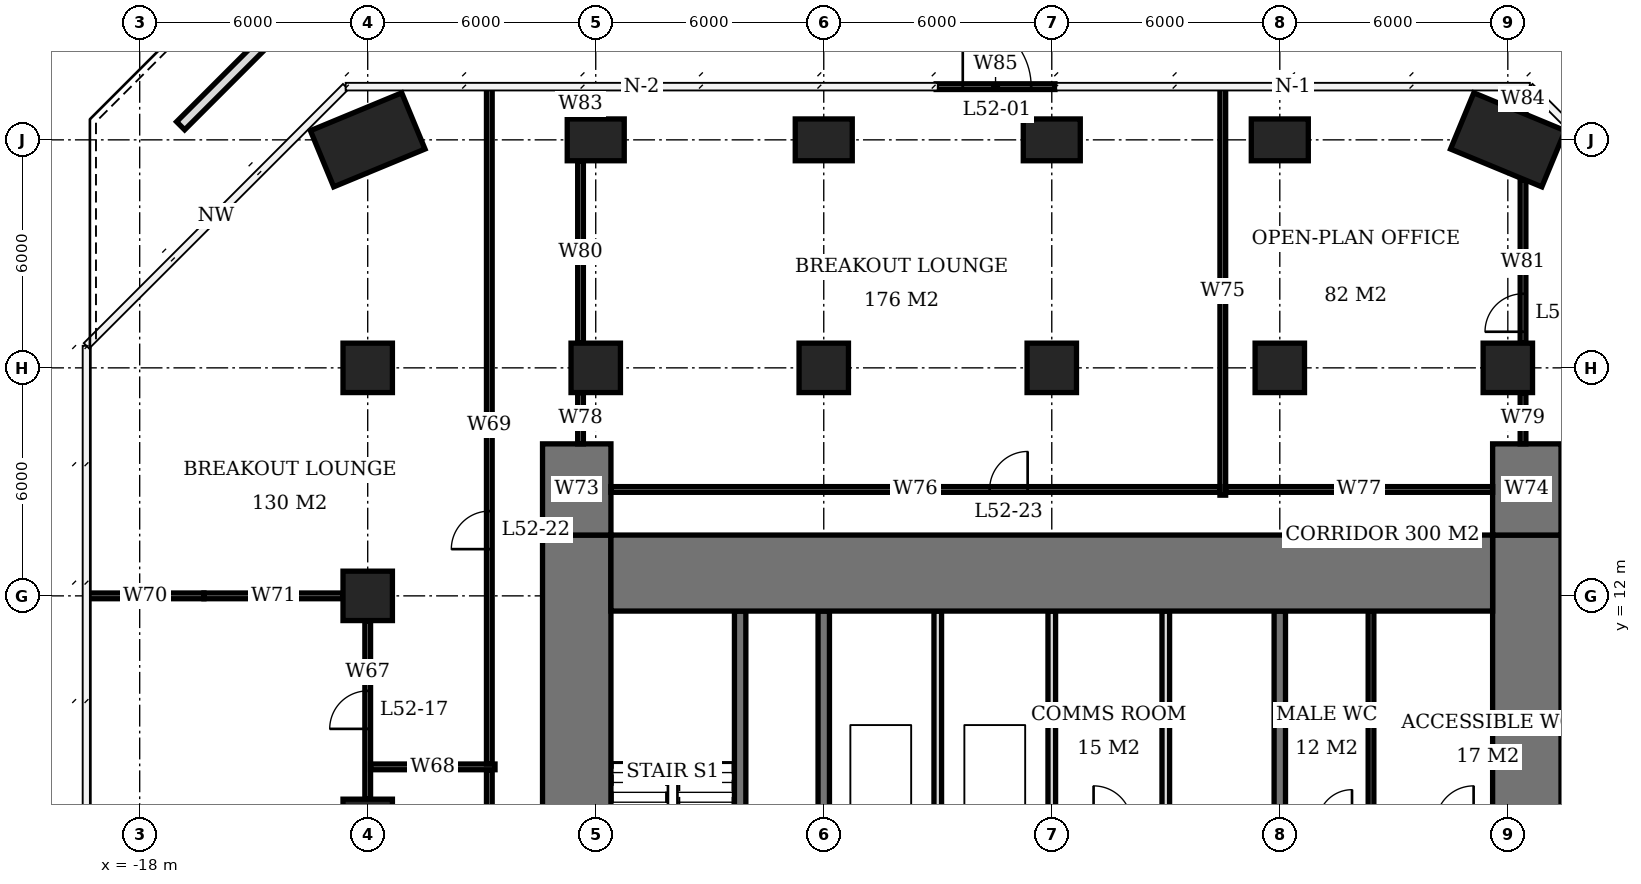
"""IFC4 building model, lengths in metres.
Left out: names, types, materials, properties, quantities, classifications, styles, units other than length and angle.
Written with IfcOpenShell. Run it as: python <this file> out.ifc"""

import sys

from ifc_helpers import new_model, si_unit, direction, frame, frame_2d, origin, origin_2d, place, context, subcontext, project, spatial, rectangle, extrude, element, fill, save


model = new_model("IFC4")
c1 = context("Model", 3, precision=1e-05, world=origin(), true_north=direction((0.0, 1.0)))
c2 = subcontext(c1, "Body", "Model", "MODEL_VIEW")
j1 = project(units=[si_unit("LENGTHUNIT", "METRE"), si_unit("PLANEANGLEUNIT", "RADIAN")], contexts=[c1])
p1 = place(None, origin())
s1 = spatial("IfcSite", under=j1, at=p1, CompositionType="ELEMENT")
p2 = place(p1, origin())
s2 = spatial("IfcBuilding", under=s1, at=p2, CompositionType="ELEMENT")
p3 = place(p2, frame((0.0, 0.0, 212.3)))
s3 = spatial("IfcBuildingStorey", under=s2, at=p3, CompositionType="ELEMENT", Elevation=212.3)
for number, where, z_axis, x_axis in (
    (1, (-12.0, 6.0, 0.0), (0.0, 0.0, 1.0), (1.0, 0.0, 0.0)),
    (2, (-12.0, 12.0, 0.0), (0.0, 0.0, 1.0), (1.0, 0.0, 0.0)),
    (3, (-12.0, 18.0, 0.0), (0.0, 0.0, 1.0), (1.0, 0.0, 0.0)),
):
    element("IfcColumn", number, at=place(p3, frame(where, z_axis=z_axis, x_axis=x_axis)), inside=s3, PredefinedType="COLUMN", context=c2, shape_type="SweptSolid", body=[
        extrude(rectangle(XDim=1.3, YDim=1.3, at=origin_2d()), origin(), (0.0, 0.0, 1.0), 3.9),
    ])
p4 = place(p3, frame((-12.0, 24.0, 0.0), z_axis=(0.0, 0.0, 1.0), x_axis=(0.923879532511, 0.382683432365, 0.0)))
e4 = element("IfcColumn", 4, at=p4, inside=s3, PredefinedType="COLUMN", context=c2, shape_type="SweptSolid", body=[
    extrude(rectangle(XDim=2.6, YDim=1.6, at=origin_2d()), origin(), (0.0, 0.0, 1.0), 3.9),
])
p5 = place(p3, frame((-6.0, 18.0, 0.0), z_axis=(0.0, 0.0, 1.0), x_axis=(1.0, 0.0, 0.0)))
e5 = element("IfcColumn", 5, at=p5, inside=s3, PredefinedType="COLUMN", context=c2, shape_type="SweptSolid", body=[
    extrude(rectangle(XDim=1.3, YDim=1.3, at=origin_2d()), origin(), (0.0, 0.0, 1.0), 3.9),
])
p6 = place(p3, frame((-6.0, 24.0, 0.0), z_axis=(0.0, 0.0, 1.0), x_axis=(1.0, 0.0, 0.0)))
e6 = element("IfcColumn", 6, at=p6, inside=s3, PredefinedType="COLUMN", context=c2, shape_type="SweptSolid", body=[
    extrude(rectangle(XDim=1.5, YDim=1.1, at=origin_2d()), origin(), (0.0, 0.0, 1.0), 3.9),
])
p7 = place(p3, frame((0.0, 18.0, 0.0), z_axis=(0.0, 0.0, 1.0), x_axis=(1.0, 0.0, 0.0)))
e7 = element("IfcColumn", 7, at=p7, inside=s3, PredefinedType="COLUMN", context=c2, shape_type="SweptSolid", body=[
    extrude(rectangle(XDim=1.3, YDim=1.3, at=origin_2d()), origin(), (0.0, 0.0, 1.0), 3.9),
])
p8 = place(p3, frame((0.0, 24.0, 0.0), z_axis=(0.0, 0.0, 1.0), x_axis=(1.0, 0.0, 0.0)))
e8 = element("IfcColumn", 8, at=p8, inside=s3, PredefinedType="COLUMN", context=c2, shape_type="SweptSolid", body=[
    extrude(rectangle(XDim=1.5, YDim=1.1, at=origin_2d()), origin(), (0.0, 0.0, 1.0), 3.9),
])
p9 = place(p3, frame((6.0, 18.0, 0.0), z_axis=(0.0, 0.0, 1.0), x_axis=(1.0, 0.0, 0.0)))
e9 = element("IfcColumn", 9, at=p9, inside=s3, PredefinedType="COLUMN", context=c2, shape_type="SweptSolid", body=[
    extrude(rectangle(XDim=1.3, YDim=1.3, at=origin_2d()), origin(), (0.0, 0.0, 1.0), 3.9),
])
p10 = place(p3, frame((6.0, 24.0, 0.0), z_axis=(0.0, 0.0, 1.0), x_axis=(1.0, 0.0, 0.0)))
e10 = element("IfcColumn", 10, at=p10, inside=s3, PredefinedType="COLUMN", context=c2, shape_type="SweptSolid", body=[
    extrude(rectangle(XDim=1.5, YDim=1.1, at=origin_2d()), origin(), (0.0, 0.0, 1.0), 3.9),
])
p11 = place(p3, frame((12.0, 18.0, 0.0), z_axis=(0.0, 0.0, 1.0), x_axis=(1.0, 0.0, 0.0)))
e11 = element("IfcColumn", 11, at=p11, inside=s3, PredefinedType="COLUMN", context=c2, shape_type="SweptSolid", body=[
    extrude(rectangle(XDim=1.3, YDim=1.3, at=origin_2d()), origin(), (0.0, 0.0, 1.0), 3.9),
])
p12 = place(p3, frame((12.0, 24.0, 0.0), z_axis=(0.0, 0.0, 1.0), x_axis=(1.0, 0.0, 0.0)))
e12 = element("IfcColumn", 12, at=p12, inside=s3, PredefinedType="COLUMN", context=c2, shape_type="SweptSolid", body=[
    extrude(rectangle(XDim=1.5, YDim=1.1, at=origin_2d()), origin(), (0.0, 0.0, 1.0), 3.9),
])
p13 = place(p3, frame((18.0, 18.0, 0.0), z_axis=(0.0, 0.0, 1.0), x_axis=(1.0, 0.0, 0.0)))
e13 = element("IfcColumn", 13, at=p13, inside=s3, PredefinedType="COLUMN", context=c2, shape_type="SweptSolid", body=[
    extrude(rectangle(XDim=1.3, YDim=1.3, at=origin_2d()), origin(), (0.0, 0.0, 1.0), 3.9),
])
p14 = place(p3, frame((18.0, 24.0, 0.0), z_axis=(0.0, 0.0, 1.0), x_axis=(0.923879532511, -0.382683432365, 0.0)))
e14 = element("IfcColumn", 14, at=p14, inside=s3, PredefinedType="COLUMN", context=c2, shape_type="SweptSolid", body=[
    extrude(rectangle(XDim=2.6, YDim=1.6, at=origin_2d()), origin(), (0.0, 0.0, 1.0), 3.9),
])
p15 = place(p3, frame((-5.6, 12.6, 0.0), z_axis=(0.0, 0.0, 1.0), x_axis=(1.0, 0.0, 0.0)))
e15 = element("IfcWall", 15, at=p15, inside=s3, PredefinedType="SHEAR", context=c2, shape_type="SweptSolid", body=[
    extrude(rectangle(XDim=23.2, YDim=2.0, at=frame_2d((11.6, 0.0))), origin(), (0.0, 0.0, 1.0), 3.9),
])
p16 = place(p3, frame((-6.5, -7.6, 0.0), z_axis=(0.0, 0.0, 1.0), x_axis=(0.0, 1.0, 0.0)))
e16 = element("IfcWall", 16, at=p16, inside=s3, PredefinedType="SHEAR", context=c2, shape_type="SweptSolid", body=[
    extrude(rectangle(XDim=21.2, YDim=1.8, at=frame_2d((10.6, 0.0))), origin(), (0.0, 0.0, 1.0), 3.9),
])
p17 = place(p16, frame((7.8, 0.0, 0.0)))
e17 = element("IfcOpeningElement", 17, at=p17, cuts=e16, PredefinedType="OPENING", context=c2, shape_type="SweptSolid", body=[
    extrude(rectangle(XDim=1.8, YDim=2.4, at=frame_2d((0.9, 1.2))), frame((0.0, 0.91, 0.0), z_axis=(0.0, -1.0, 0.0), x_axis=(1.0, 0.0, 0.0)), (0.0, 0.0, 1.0), 1.82),
])
p18 = place(p3, frame((18.5, -7.6, 0.0), z_axis=(0.0, 0.0, 1.0), x_axis=(0.0, 1.0, 0.0)))
e18 = element("IfcWall", 18, at=p18, inside=s3, PredefinedType="SHEAR", context=c2, shape_type="SweptSolid", body=[
    extrude(rectangle(XDim=21.2, YDim=1.8, at=frame_2d((10.6, 0.0))), origin(), (0.0, 0.0, 1.0), 3.9),
])
p19 = place(p18, frame((9.2, 0.0, 0.0)))
e19 = element("IfcOpeningElement", 19, at=p19, cuts=e18, PredefinedType="OPENING", context=c2, shape_type="SweptSolid", body=[
    extrude(rectangle(XDim=1.8, YDim=2.4, at=frame_2d((0.9, 1.2))), frame((0.0, 0.91, 0.0), z_axis=(0.0, -1.0, 0.0), x_axis=(1.0, 0.0, 0.0)), (0.0, 0.0, 1.0), 1.82),
])
for number, where, z_axis, x_axis in (
    (20, (-6.5, 13.6, 0.0), (0.0, 0.0, 1.0), (0.0, 1.0, 0.0)),
    (21, (18.5, 13.6, 0.0), (0.0, 0.0, 1.0), (0.0, 1.0, 0.0)),
):
    element("IfcWall", number, at=place(p3, frame(where, z_axis=z_axis, x_axis=x_axis)), inside=s3, PredefinedType="SHEAR", context=c2, shape_type="SweptSolid", body=[
        extrude(rectangle(XDim=2.4, YDim=1.8, at=frame_2d((1.2, 0.0))), origin(), (0.0, 0.0, 1.0), 3.9),
    ])
p20 = place(p3, frame((0.0, 3.15, 0.0), z_axis=(0.0, 0.0, 1.0), x_axis=(0.0, 1.0, 0.0)))
e22 = element("IfcWall", 22, at=p20, inside=s3, PredefinedType="SHEAR", context=c2, shape_type="SweptSolid", body=[
    extrude(rectangle(XDim=8.45, YDim=0.3, at=frame_2d((4.225, 0.0))), origin(), (0.0, 0.0, 1.0), 3.9),
])
p21 = place(p3, frame((12.0, 6.15, 0.0), z_axis=(0.0, 0.0, 1.0), x_axis=(0.0, 1.0, 0.0)))
e23 = element("IfcWall", 23, at=p21, inside=s3, PredefinedType="SHEAR", context=c2, shape_type="SweptSolid", body=[
    extrude(rectangle(XDim=5.45, YDim=0.3, at=frame_2d((2.725, 0.0))), origin(), (0.0, 0.0, 1.0), 3.9),
])
p22 = place(p3, frame((-2.2, 3.15, 0.0), z_axis=(0.0, 0.0, 1.0), x_axis=(0.0, 1.0, 0.0)))
e24 = element("IfcWall", 24, at=p22, inside=s3, PredefinedType="SHEAR", context=c2, shape_type="SweptSolid", body=[
    extrude(rectangle(XDim=8.45, YDim=0.3, at=frame_2d((4.225, 0.0))), origin(), (0.0, 0.0, 1.0), 3.9),
])
for number, where, z_axis, x_axis in (
    (25, (3.0, 6.15, 0.0), (0.0, 0.0, 1.0), (0.0, 1.0, 0.0)),
    (26, (6.0, 6.15, 0.0), (0.0, 0.0, 1.0), (0.0, 1.0, 0.0)),
    (27, (9.0, 6.15, 0.0), (0.0, 0.0, 1.0), (0.0, 1.0, 0.0)),
):
    element("IfcWall", number, at=place(p3, frame(where, z_axis=z_axis, x_axis=x_axis)), inside=s3, PredefinedType="SOLIDWALL", context=c2, shape_type="SweptSolid", body=[
        extrude(rectangle(XDim=5.45, YDim=0.2, at=frame_2d((2.725, 0.0))), origin(), (0.0, 0.0, 1.0), 3.9),
    ])
p23 = place(p3, frame((2.958, 25.4, 0.0), z_axis=(0.0, 0.0, 1.0), x_axis=(1.0, 0.0, 0.0)))
e28 = element("IfcWall", 28, at=p23, inside=s3, PredefinedType="USERDEFINED", context=c2, shape_type="SweptSolid", body=[
    extrude(rectangle(XDim=3.126, YDim=0.15, at=frame_2d((1.563, 0.0))), origin(), (0.0, 0.0, 1.0), 3.9),
])
p24 = place(p23, frame((0.7, 0.0, 0.0)))
e29 = element("IfcOpeningElement", 29, at=p24, cuts=e28, PredefinedType="OPENING", context=c2, shape_type="SweptSolid", body=[
    extrude(rectangle(XDim=1.8, YDim=2.4, at=frame_2d((0.9, 1.2))), frame((0.0, 0.085, 0.0), z_axis=(0.0, -1.0, 0.0), x_axis=(1.0, 0.0, 0.0)), (0.0, 0.0, 1.0), 0.17),
])
for number, where, z_axis, x_axis in (
    (30, (-16.923, 24.37, 0.0), (0.0, 0.0, 1.0), (0.707, 0.707, 0.0)),
    (31, (18.37, 28.923, 0.0), (0.0, 0.0, 1.0), (0.707, -0.707, 0.0)),
):
    element("IfcWall", number, at=place(p3, frame(where, z_axis=z_axis, x_axis=x_axis)), inside=s3, PredefinedType="USERDEFINED", context=c2, shape_type="SweptSolid", body=[
        extrude(rectangle(XDim=6.438, YDim=0.3, at=frame_2d((3.219, 0.0))), origin(), (0.0, 0.0, 1.0), 0.6),
    ])
p25 = place(p3, frame((14.4, 6.15, 0.0), z_axis=(0.0, 0.0, 1.0), x_axis=(0.0, 1.0, 0.0)))
e32 = element("IfcWall", 32, at=p25, inside=s3, PredefinedType="PLUMBINGWALL", context=c2, shape_type="SweptSolid", body=[
    extrude(rectangle(XDim=5.45, YDim=0.15, at=frame_2d((2.725, 0.0))), origin(), (0.0, 0.0, 1.0), 3.65),
])
p26 = place(p3, frame((-19.4, 12.0, 0.0), z_axis=(0.0, 0.0, 1.0), x_axis=(1.0, 0.0, 0.0)))
e33 = element("IfcWall", 33, at=p26, inside=s3, PredefinedType="PARTITIONING", context=c2, shape_type="SweptSolid", body=[
    extrude(rectangle(XDim=3.09, YDim=0.15, at=frame_2d((1.545, 0.0))), origin(), (0.0, 0.0, 1.0), 3.65),
])
p27 = place(p3, frame((-16.31, 12.0, 0.0), z_axis=(0.0, 0.0, 1.0), x_axis=(1.0, 0.0, 0.0)))
e34 = element("IfcWall", 34, at=p27, inside=s3, PredefinedType="PARTITIONING", context=c2, shape_type="SweptSolid", body=[
    extrude(rectangle(XDim=3.66, YDim=0.15, at=frame_2d((1.83, 0.0))), origin(), (0.0, 0.0, 1.0), 2.65),
])
p28 = place(p3, frame((-12.0, 6.66, 0.0), z_axis=(0.0, 0.0, 1.0), x_axis=(0.0, 1.0, 0.0)))
e35 = element("IfcWall", 35, at=p28, inside=s3, PredefinedType="PARTITIONING", context=c2, shape_type="SweptSolid", body=[
    extrude(rectangle(XDim=4.68, YDim=0.15, at=frame_2d((2.34, 0.0))), origin(), (0.0, 0.0, 1.0), 3.65),
])
p29 = place(p28, frame((1.84, 0.0, 0.0)))
e36 = element("IfcOpeningElement", 36, at=p29, cuts=e35, PredefinedType="OPENING", context=c2, shape_type="SweptSolid", body=[
    extrude(rectangle(XDim=1.0, YDim=2.1, at=frame_2d((0.5, 1.05))), frame((0.0, 0.085, 0.0), z_axis=(0.0, -1.0, 0.0), x_axis=(1.0, 0.0, 0.0)), (0.0, 0.0, 1.0), 0.17),
])
p30 = place(p3, frame((-11.925, 7.5, 0.0), z_axis=(0.0, 0.0, 1.0), x_axis=(1.0, 0.0, 0.0)))
e37 = element("IfcWall", 37, at=p30, inside=s3, PredefinedType="PARTITIONING", context=c2, shape_type="SweptSolid", body=[
    extrude(rectangle(XDim=3.275, YDim=0.15, at=frame_2d((1.638, 0.0))), origin(), (0.0, 0.0, 1.0), 3.65),
])
p31 = place(p3, frame((-8.8, -13.008, 0.0), z_axis=(0.0, 0.0, 1.0), x_axis=(0.0, 1.0, 0.0)))
e38 = element("IfcWall", 38, at=p31, inside=s3, PredefinedType="PARTITIONING", context=c2, shape_type="SweptSolid", body=[
    extrude(rectangle(XDim=20.433, YDim=0.15, at=frame_2d((10.216, 0.0))), origin(), (0.0, 0.0, 1.0), 3.65),
])
p32 = place(p31, frame((6.407, 0.0, 0.0)))
e39 = element("IfcOpeningElement", 39, at=p32, cuts=e38, PredefinedType="OPENING", context=c2, shape_type="SweptSolid", body=[
    extrude(rectangle(XDim=1.0, YDim=2.1, at=frame_2d((0.5, 1.05))), frame((0.0, 0.085, 0.0), z_axis=(0.0, -1.0, 0.0), x_axis=(1.0, 0.0, 0.0)), (0.0, 0.0, 1.0), 0.17),
])
p33 = place(p3, frame((-8.8, 7.575, 0.0), z_axis=(0.0, 0.0, 1.0), x_axis=(0.0, 1.0, 0.0)))
e40 = element("IfcWall", 40, at=p33, inside=s3, PredefinedType="PARTITIONING", context=c2, shape_type="SweptSolid", body=[
    extrude(rectangle(XDim=17.825, YDim=0.15, at=frame_2d((8.913, 0.0))), origin(), (0.0, 0.0, 1.0), 3.65),
])
p34 = place(p33, frame((5.655, 0.0, 0.0)))
e41 = element("IfcOpeningElement", 41, at=p34, cuts=e40, PredefinedType="OPENING", context=c2, shape_type="SweptSolid", body=[
    extrude(rectangle(XDim=1.0, YDim=2.1, at=frame_2d((0.5, 1.05))), frame((0.0, 0.085, 0.0), z_axis=(0.0, -1.0, 0.0), x_axis=(1.0, 0.0, 0.0)), (0.0, 0.0, 1.0), 0.17),
])
p35 = place(p3, frame((-6.4, 16.0, 0.0), z_axis=(0.0, 0.0, 1.0), x_axis=(0.0, 1.0, 0.0)))
e42 = element("IfcWall", 42, at=p35, inside=s3, PredefinedType="PARTITIONING", context=c2, shape_type="SweptSolid", body=[
    extrude(rectangle(XDim=1.35, YDim=0.15, at=frame_2d((0.675, 0.0))), origin(), (0.0, 0.0, 1.0), 3.65),
])
p36 = place(p3, frame((-6.4, 18.65, 0.0), z_axis=(0.0, 0.0, 1.0), x_axis=(0.0, 1.0, 0.0)))
e43 = element("IfcWall", 43, at=p36, inside=s3, PredefinedType="PARTITIONING", context=c2, shape_type="SweptSolid", body=[
    extrude(rectangle(XDim=4.8, YDim=0.15, at=frame_2d((2.4, 0.0))), origin(), (0.0, 0.0, 1.0), 3.65),
])
p37 = place(p3, frame((-6.4, 24.55, 0.0), z_axis=(0.0, 0.0, 1.0), x_axis=(0.0, 1.0, 0.0)))
e44 = element("IfcWall", 44, at=p37, inside=s3, PredefinedType="PARTITIONING", context=c2, shape_type="SweptSolid", body=[
    extrude(rectangle(XDim=0.8, YDim=0.15, at=frame_2d((0.4, 0.0))), origin(), (0.0, 0.0, 1.0), 3.65),
])
p38 = place(p3, frame((-5.6, 14.8, 0.0), z_axis=(0.0, 0.0, 1.0), x_axis=(1.0, 0.0, 0.0)))
e45 = element("IfcWall", 45, at=p38, inside=s3, PredefinedType="PARTITIONING", context=c2, shape_type="SweptSolid", body=[
    extrude(rectangle(XDim=16.025, YDim=0.15, at=frame_2d((8.013, 0.0))), origin(), (0.0, 0.0, 1.0), 3.65),
])
p39 = place(p38, frame((9.965, 0.0, 0.0)))
e46 = element("IfcOpeningElement", 46, at=p39, cuts=e45, PredefinedType="OPENING", context=c2, shape_type="SweptSolid", body=[
    extrude(rectangle(XDim=1.0, YDim=2.1, at=frame_2d((0.5, 1.05))), frame((0.0, 0.085, 0.0), z_axis=(0.0, -1.0, 0.0), x_axis=(1.0, 0.0, 0.0)), (0.0, 0.0, 1.0), 0.17),
])
p40 = place(p3, frame((10.5, 14.65, 0.0), z_axis=(0.0, 0.0, 1.0), x_axis=(0.0, 1.0, 0.0)))
e47 = element("IfcWall", 47, at=p40, inside=s3, PredefinedType="PARTITIONING", context=c2, shape_type="SweptSolid", body=[
    extrude(rectangle(XDim=10.75, YDim=0.15, at=frame_2d((5.375, 0.0))), origin(), (0.0, 0.0, 1.0), 3.65),
])
p41 = place(p3, frame((10.575, 14.8, 0.0), z_axis=(0.0, 0.0, 1.0), x_axis=(1.0, 0.0, 0.0)))
e48 = element("IfcWall", 48, at=p41, inside=s3, PredefinedType="PARTITIONING", context=c2, shape_type="SweptSolid", body=[
    extrude(rectangle(XDim=7.025, YDim=0.15, at=frame_2d((3.513, 0.0))), origin(), (0.0, 0.0, 1.0), 3.65),
])
p42 = place(p3, frame((18.4, 16.0, 0.0), z_axis=(0.0, 0.0, 1.0), x_axis=(0.0, 1.0, 0.0)))
e49 = element("IfcWall", 49, at=p42, inside=s3, PredefinedType="PARTITIONING", context=c2, shape_type="SweptSolid", body=[
    extrude(rectangle(XDim=1.35, YDim=0.15, at=frame_2d((0.675, 0.0))), origin(), (0.0, 0.0, 1.0), 3.65),
])
p43 = place(p3, frame((18.4, 18.65, 0.0), z_axis=(0.0, 0.0, 1.0), x_axis=(0.0, 1.0, 0.0)))
e50 = element("IfcWall", 50, at=p43, inside=s3, PredefinedType="PARTITIONING", context=c2, shape_type="SweptSolid", body=[
    extrude(rectangle(XDim=4.287, YDim=0.15, at=frame_2d((2.144, 0.0))), origin(), (0.0, 0.0, 1.0), 3.65),
])
p44 = place(p43, frame((0.3, 0.0, 0.0)))
e51 = element("IfcOpeningElement", 51, at=p44, cuts=e50, PredefinedType="OPENING", context=c2, shape_type="SweptSolid", body=[
    extrude(rectangle(XDim=1.0, YDim=2.1, at=frame_2d((0.5, 1.05))), frame((0.0, 0.085, 0.0), z_axis=(0.0, -1.0, 0.0), x_axis=(1.0, 0.0, 0.0)), (0.0, 0.0, 1.0), 0.17),
])
p45 = place(p3, frame((18.4, 24.731, 0.0), z_axis=(0.0, 0.0, 1.0), x_axis=(0.0, 1.0, 0.0)))
e52 = element("IfcWall", 52, at=p45, inside=s3, PredefinedType="PARTITIONING", context=c2, shape_type="SweptSolid", body=[
    extrude(rectangle(XDim=0.669, YDim=0.15, at=frame_2d((0.334, 0.0))), origin(), (0.0, 0.0, 1.0), 3.65),
])
p46 = place(p24, origin())
e53 = element("IfcDoor", 53, at=p46, inside=s3, OperationType="DOUBLE_DOOR_SINGLE_SWING", PredefinedType="DOOR", context=c2, shape_type="SweptSolid", body=[
    extrude(rectangle(XDim=1.8, YDim=2.4, at=frame_2d((0.9, 1.2))), frame((0.0, 0.025, 0.0), z_axis=(0.0, -1.0, 0.0), x_axis=(1.0, 0.0, 0.0)), (0.0, 0.0, 1.0), 0.05),
])
fill(e29, e53)
p47 = place(p29, origin())
e54 = element("IfcDoor", 54, at=p47, inside=s3, OperationType="SINGLE_SWING_LEFT", PredefinedType="DOOR", context=c2, shape_type="SweptSolid", body=[
    extrude(rectangle(XDim=1.0, YDim=2.1, at=frame_2d((0.5, 1.05))), frame((0.0, 0.025, 0.0), z_axis=(0.0, -1.0, 0.0), x_axis=(1.0, 0.0, 0.0)), (0.0, 0.0, 1.0), 0.05),
])
fill(e36, e54)
p48 = place(p34, origin())
e55 = element("IfcDoor", 55, at=p48, inside=s3, OperationType="SINGLE_SWING_LEFT", PredefinedType="DOOR", context=c2, shape_type="SweptSolid", body=[
    extrude(rectangle(XDim=1.0, YDim=2.1, at=frame_2d((0.5, 1.05))), frame((0.0, 0.025, 0.0), z_axis=(0.0, -1.0, 0.0), x_axis=(1.0, 0.0, 0.0)), (0.0, 0.0, 1.0), 0.05),
])
fill(e41, e55)
p49 = place(p39, origin())
e56 = element("IfcDoor", 56, at=p49, inside=s3, OperationType="SINGLE_SWING_RIGHT", PredefinedType="DOOR", context=c2, shape_type="SweptSolid", body=[
    extrude(rectangle(XDim=1.0, YDim=2.1, at=frame_2d((0.5, 1.05))), frame((0.0, 0.025, 0.0), z_axis=(0.0, -1.0, 0.0), x_axis=(1.0, 0.0, 0.0)), (0.0, 0.0, 1.0), 0.05),
])
fill(e46, e56)
p50 = place(p44, origin())
e57 = element("IfcDoor", 57, at=p50, inside=s3, OperationType="SINGLE_SWING_LEFT", PredefinedType="DOOR", context=c2, shape_type="SweptSolid", body=[
    extrude(rectangle(XDim=1.0, YDim=2.1, at=frame_2d((0.5, 1.05))), frame((0.0, 0.025, 0.0), z_axis=(0.0, -1.0, 0.0), x_axis=(1.0, 0.0, 0.0)), (0.0, 0.0, 1.0), 0.05),
])
fill(e51, e57)
save(model, sys.argv[1])
